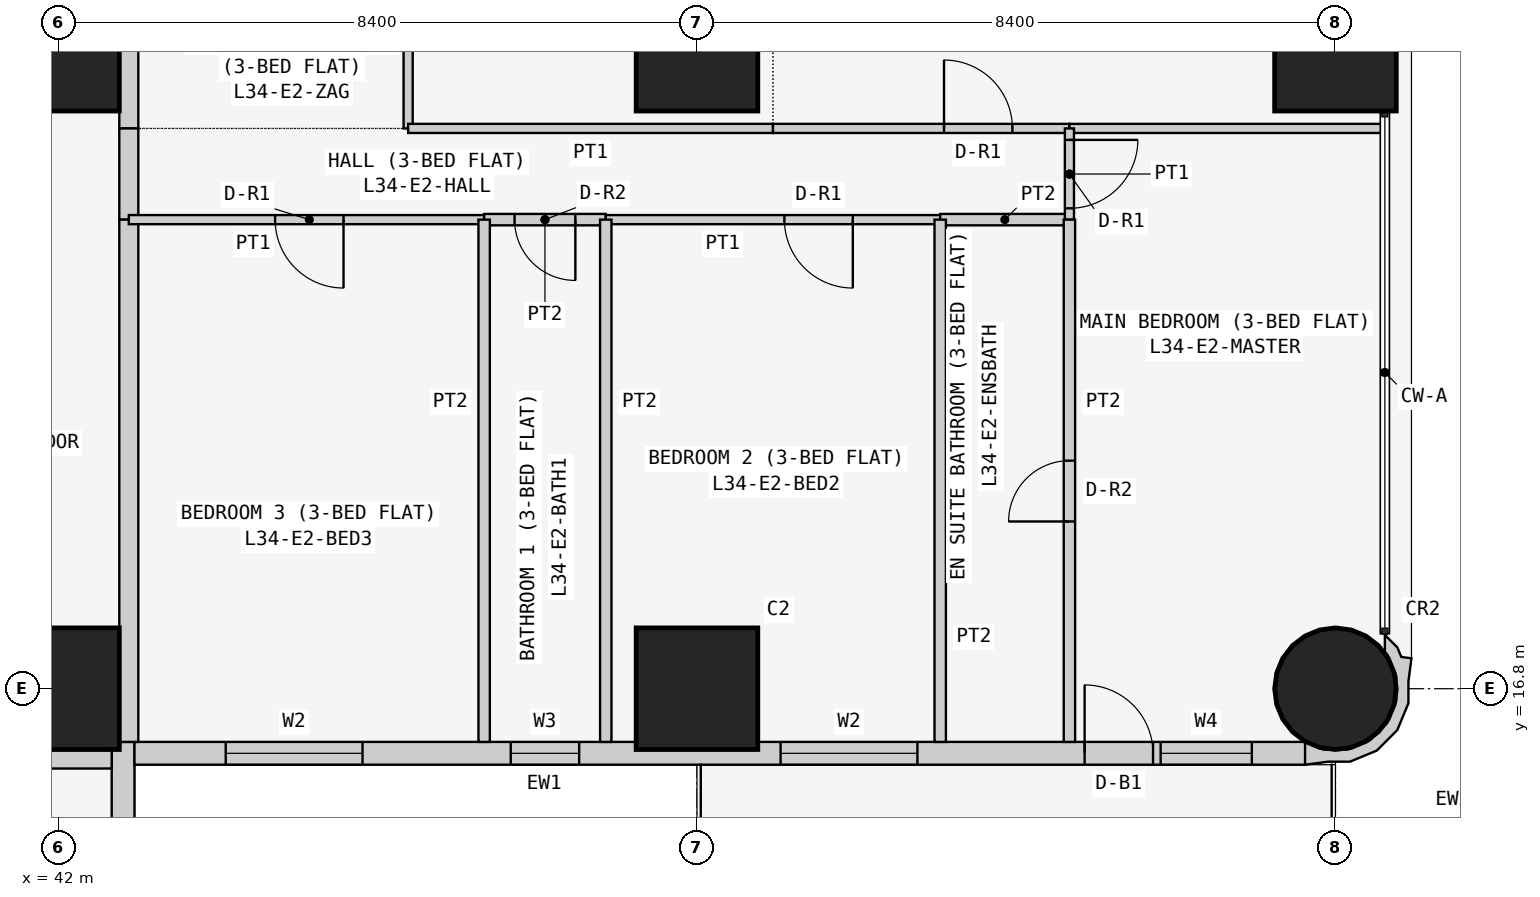
"""IFC4 building model, lengths in metres.
Left out: names, types, materials, properties, quantities, classifications, styles, units other than length and angle.
Written with IfcOpenShell. Run it as: python <this file> out.ifc"""

import sys

from ifc_helpers import new_model, si_unit, direction, frame, frame_2d, origin, origin_2d, place, context, subcontext, project, spatial, polyline, rectangle, circle, outline, extrude, element, fill, save


model = new_model("IFC4")
c1 = context("Model", 3, precision=1e-05, world=origin(), true_north=direction((0.0, 1.0)))
c2 = subcontext(c1, "Body", "Model", "MODEL_VIEW")
j1 = project(units=[si_unit("LENGTHUNIT", "METRE"), si_unit("PLANEANGLEUNIT", "RADIAN")], contexts=[c1])
p1 = place(None, origin())
s1 = spatial("IfcSite", under=j1, at=p1, CompositionType="ELEMENT")
p2 = place(p1, origin())
s2 = spatial("IfcBuilding", under=s1, at=p2, CompositionType="ELEMENT")
p3 = place(p2, frame((0.0, 0.0, 134.1)))
s3 = spatial("IfcBuildingStorey", under=s2, at=p3, CompositionType="ELEMENT", Elevation=134.1)
for number, where, z_axis, x_axis in (
    (1, (42.0, 16.8, 0.0), (0.0, 0.0, 1.0), (1.0, 0.0, 0.0)),
    (2, (42.0, 25.2, 0.0), (0.0, 0.0, 1.0), (1.0, 0.0, 0.0)),
    (3, (50.4, 16.8, 0.0), (0.0, 0.0, 1.0), (1.0, 0.0, 0.0)),
    (4, (50.4, 25.2, 0.0), (0.0, 0.0, 1.0), (1.0, 0.0, 0.0)),
):
    element("IfcColumn", number, at=place(p3, frame(where, z_axis=z_axis, x_axis=x_axis)), inside=s3, PredefinedType="COLUMN", context=c2, shape_type="SweptSolid", body=[
        extrude(rectangle(XDim=1.6, YDim=1.6, at=origin_2d()), origin(), (0.0, 0.0, 1.0), 3.6),
    ])
p4 = place(p3, frame((58.8, 16.8, 0.0), z_axis=(0.0, 0.0, 1.0), x_axis=(1.0, 0.0, 0.0)))
e5 = element("IfcColumn", 5, at=p4, inside=s3, PredefinedType="COLUMN", context=c2, shape_type="SweptSolid", body=[
    extrude(circle(Radius=0.8, at=origin_2d()), origin(), (0.0, 0.0, 1.0), 3.6),
])
p5 = place(p3, frame((58.8, 25.2, 0.0), z_axis=(0.0, 0.0, 1.0), x_axis=(1.0, 0.0, 0.0)))
e6 = element("IfcColumn", 6, at=p5, inside=s3, PredefinedType="COLUMN", context=c2, shape_type="SweptSolid", body=[
    extrude(rectangle(XDim=1.6, YDim=1.6, at=origin_2d()), origin(), (0.0, 0.0, 1.0), 3.6),
])
p6 = place(p3, frame((42.85, 8.8, 0.0), z_axis=(0.0, 0.0, 1.0), x_axis=(0.0, 1.0, 0.0)))
e7 = element("IfcWall", 7, at=p6, inside=s3, PredefinedType="SOLIDWALL", context=c2, shape_type="SweptSolid", body=[
    extrude(rectangle(XDim=7.3, YDim=0.3, at=frame_2d((3.65, 0.0))), origin(), (0.0, 0.0, 1.0), 3.45),
])
p7 = place(p6, frame((3.1, 0.0, 0.9)))
e8 = element("IfcOpeningElement", 8, at=p7, cuts=e7, PredefinedType="OPENING", context=c2, shape_type="SweptSolid", body=[
    extrude(rectangle(XDim=2.4, YDim=1.5, at=frame_2d((1.2, 0.75))), frame((0.0, 0.16, 0.0), z_axis=(0.0, -1.0, 0.0), x_axis=(1.0, 0.0, 0.0)), (0.0, 0.0, 1.0), 0.32),
])
p8 = place(p6, frame((0.75, 0.0, 0.9)))
e9 = element("IfcOpeningElement", 9, at=p8, cuts=e7, PredefinedType="OPENING", context=c2, shape_type="SweptSolid", body=[
    extrude(rectangle(XDim=1.2, YDim=1.5, at=frame_2d((0.6, 0.75))), frame((0.0, 0.16, 0.0), z_axis=(0.0, -1.0, 0.0), x_axis=(1.0, 0.0, 0.0)), (0.0, 0.0, 1.0), 0.32),
])
p9 = place(p3, frame((43.0, 15.95, 0.0), z_axis=(0.0, 0.0, 1.0), x_axis=(1.0, 0.0, 0.0)))
e10 = element("IfcWall", 10, at=p9, inside=s3, PredefinedType="SOLIDWALL", context=c2, shape_type="SweptSolid", body=[
    extrude(rectangle(XDim=15.4, YDim=0.3, at=frame_2d((7.7, 0.0))), origin(), (0.0, 0.0, 1.0), 3.45),
])
p10 = place(p9, frame((1.2, 0.0, 0.9)))
e11 = element("IfcOpeningElement", 11, at=p10, cuts=e10, PredefinedType="OPENING", context=c2, shape_type="SweptSolid", body=[
    extrude(rectangle(XDim=1.8, YDim=1.5, at=frame_2d((0.9, 0.75))), frame((0.0, 0.16, 0.0), z_axis=(0.0, -1.0, 0.0), x_axis=(1.0, 0.0, 0.0)), (0.0, 0.0, 1.0), 0.32),
])
p11 = place(p9, frame((4.95, 0.0, 1.5)))
e12 = element("IfcOpeningElement", 12, at=p11, cuts=e10, PredefinedType="OPENING", context=c2, shape_type="SweptSolid", body=[
    extrude(rectangle(XDim=0.9, YDim=0.7, at=frame_2d((0.45, 0.35))), frame((0.0, 0.16, 0.0), z_axis=(0.0, -1.0, 0.0), x_axis=(1.0, 0.0, 0.0)), (0.0, 0.0, 1.0), 0.32),
])
p12 = place(p9, frame((8.5, 0.0, 0.9)))
e13 = element("IfcOpeningElement", 13, at=p12, cuts=e10, PredefinedType="OPENING", context=c2, shape_type="SweptSolid", body=[
    extrude(rectangle(XDim=1.8, YDim=1.5, at=frame_2d((0.9, 0.75))), frame((0.0, 0.16, 0.0), z_axis=(0.0, -1.0, 0.0), x_axis=(1.0, 0.0, 0.0)), (0.0, 0.0, 1.0), 0.32),
])
p13 = place(p9, frame((12.5, 0.0, 0.0)))
e14 = element("IfcOpeningElement", 14, at=p13, cuts=e10, PredefinedType="OPENING", context=c2, shape_type="SweptSolid", body=[
    extrude(rectangle(XDim=0.9, YDim=2.4, at=frame_2d((0.45, 1.2))), frame((0.0, 0.16, 0.0), z_axis=(0.0, -1.0, 0.0), x_axis=(1.0, 0.0, 0.0)), (0.0, 0.0, 1.0), 0.32),
])
p14 = place(p9, frame((13.5, 0.0, 0.9)))
e15 = element("IfcOpeningElement", 15, at=p14, cuts=e10, PredefinedType="OPENING", context=c2, shape_type="SweptSolid", body=[
    extrude(rectangle(XDim=1.2, YDim=1.5, at=frame_2d((0.6, 0.75))), frame((0.0, 0.16, 0.0), z_axis=(0.0, -1.0, 0.0), x_axis=(1.0, 0.0, 0.0)), (0.0, 0.0, 1.0), 0.32),
])
p15 = place(p3, frame((58.473, 15.983, 0.0), z_axis=(0.0, 0.0, 1.0), x_axis=(0.93923434088, -0.343276641956, 0.0)))
e16 = element("IfcWall", 16, at=p15, inside=s3, PredefinedType="SOLIDWALL", context=c2, shape_type="SweptSolid", body=[
    extrude(outline(polyline([(0.828, 1.599), (0.697, 1.569), (0.604, 1.67), (0.394, 1.767), (0.471, 1.556), (0.508, 1.539), (0.724, 1.304), (0.834, 1.005), (0.82, 0.686), (0.686, 0.397), (0.451, 0.182), (0.152, 0.073), (-0.116, 0.084), (-0.127, 0.078), (-0.146, 0.071), (-0.006, -0.197), (0.266, -0.055), (0.535, 0.044), (0.817, 0.302), (0.978, 0.648), (0.994, 1.03), (0.895, 1.3), (0.828, 1.599)])), origin(), (0.0, 0.0, 1.0), 3.45),
])
p16 = place(p3, frame((42.925, 29.4, 0.0), z_axis=(0.0, 0.0, 1.0), x_axis=(0.0, -1.0, 0.0)))
e17 = element("IfcWall", 17, at=p16, inside=s3, PredefinedType="PARTITIONING", context=c2, shape_type="SweptSolid", body=[
    extrude(rectangle(XDim=5.229, YDim=0.25, at=frame_2d((2.615, 0.0))), origin(), (0.0, 0.0, 1.0), 3.45),
])
p17 = place(p16, frame((2.1, 0.0, 0.0)))
e18 = element("IfcOpeningElement", 18, at=p17, cuts=e17, PredefinedType="OPENING", context=c2, shape_type="SweptSolid", body=[
    extrude(rectangle(XDim=1.0, YDim=2.1, at=frame_2d((0.5, 1.05))), frame((0.0, 0.135, 0.0), z_axis=(0.0, -1.0, 0.0), x_axis=(1.0, 0.0, 0.0)), (0.0, 0.0, 1.0), 0.27),
])
p18 = place(p3, frame((42.925, 24.171, 0.0), z_axis=(0.0, 0.0, 1.0), x_axis=(0.0, -1.0, 0.0)))
e19 = element("IfcWall", 19, at=p18, inside=s3, PredefinedType="PARTITIONING", context=c2, shape_type="SweptSolid", body=[
    extrude(rectangle(XDim=1.2, YDim=0.25, at=frame_2d((0.6, 0.0))), origin(), (0.0, 0.0, 1.0), 3.45),
])
for number, where, z_axis, x_axis in (
    (20, (42.925, 22.971, 0.0), (0.0, 0.0, 1.0), (0.0, -1.0, 0.0)),
    (21, (42.7, 15.875, 0.0), (0.0, 0.0, 1.0), (-1.0, 0.0, 0.0)),
):
    element("IfcWall", number, at=place(p3, frame(where, z_axis=z_axis, x_axis=x_axis)), inside=s3, PredefinedType="PARTITIONING", context=c2, shape_type="SweptSolid", body=[
        extrude(rectangle(XDim=6.871, YDim=0.25, at=frame_2d((3.436, 0.0))), origin(), (0.0, 0.0, 1.0), 3.45),
    ])
p19 = place(p3, frame((46.6, 29.4, 0.0), z_axis=(0.0, 0.0, 1.0), x_axis=(0.0, -1.0, 0.0)))
e22 = element("IfcWall", 22, at=p19, inside=s3, PredefinedType="PARTITIONING", context=c2, shape_type="SweptSolid", body=[
    extrude(rectangle(XDim=5.229, YDim=0.12, at=frame_2d((2.615, 0.0))), origin(), (0.0, 0.0, 1.0), 3.45),
])
p20 = place(p19, frame((1.05, 0.0, 0.0)))
e23 = element("IfcOpeningElement", 23, at=p20, cuts=e22, PredefinedType="OPENING", context=c2, shape_type="SweptSolid", body=[
    extrude(rectangle(XDim=0.9, YDim=2.1, at=frame_2d((0.45, 1.05))), frame((0.0, 0.07, 0.0), z_axis=(0.0, -1.0, 0.0), x_axis=(1.0, 0.0, 0.0)), (0.0, 0.0, 1.0), 0.14),
])
p21 = place(p3, frame((51.4, 24.171, 0.0), z_axis=(0.0, 0.0, 1.0), x_axis=(-1.0, 0.0, 0.0)))
e24 = element("IfcWall", 24, at=p21, inside=s3, PredefinedType="PARTITIONING", context=c2, shape_type="SweptSolid", body=[
    extrude(rectangle(XDim=4.8, YDim=0.12, at=frame_2d((2.4, 0.0))), origin(), (0.0, 0.0, 1.0), 3.45),
])
p22 = place(p3, frame((55.3, 24.171, 0.0), z_axis=(0.0, 0.0, 1.0), x_axis=(-1.0, 0.0, 0.0)))
e25 = element("IfcWall", 25, at=p22, inside=s3, PredefinedType="PARTITIONING", context=c2, shape_type="SweptSolid", body=[
    extrude(rectangle(XDim=3.9, YDim=0.12, at=frame_2d((1.95, 0.0))), origin(), (0.0, 0.0, 1.0), 3.45),
])
p23 = place(p22, frame((0.75, 0.0, 0.0)))
e26 = element("IfcOpeningElement", 26, at=p23, cuts=e25, PredefinedType="OPENING", context=c2, shape_type="SweptSolid", body=[
    extrude(rectangle(XDim=0.9, YDim=2.1, at=frame_2d((0.45, 1.05))), frame((0.0, 0.07, 0.0), z_axis=(0.0, -1.0, 0.0), x_axis=(1.0, 0.0, 0.0)), (0.0, 0.0, 1.0), 0.14),
])
p24 = place(p3, frame((59.45, 24.171, 0.0), z_axis=(0.0, 0.0, 1.0), x_axis=(-1.0, 0.0, 0.0)))
e27 = element("IfcWall", 27, at=p24, inside=s3, PredefinedType="PARTITIONING", context=c2, shape_type="SweptSolid", body=[
    extrude(rectangle(XDim=4.15, YDim=0.12, at=frame_2d((2.075, 0.0))), origin(), (0.0, 0.0, 1.0), 3.45),
])
p25 = place(p3, frame((47.6, 22.971, 0.0), z_axis=(0.0, 0.0, 1.0), x_axis=(-1.0, 0.0, 0.0)))
e28 = element("IfcWall", 28, at=p25, inside=s3, PredefinedType="PARTITIONING", context=c2, shape_type="SweptSolid", body=[
    extrude(rectangle(XDim=4.675, YDim=0.12, at=frame_2d((2.337, 0.0))), origin(), (0.0, 0.0, 1.0), 3.45),
])
p26 = place(p25, frame((1.85, 0.0, 0.0)))
e29 = element("IfcOpeningElement", 29, at=p26, cuts=e28, PredefinedType="OPENING", context=c2, shape_type="SweptSolid", body=[
    extrude(rectangle(XDim=0.9, YDim=2.1, at=frame_2d((0.45, 1.05))), frame((0.0, 0.07, 0.0), z_axis=(0.0, -1.0, 0.0), x_axis=(1.0, 0.0, 0.0)), (0.0, 0.0, 1.0), 0.14),
])
p27 = place(p3, frame((49.2, 22.971, 0.0), z_axis=(0.0, 0.0, 1.0), x_axis=(-1.0, 0.0, 0.0)))
e30 = element("IfcWall", 30, at=p27, inside=s3, PredefinedType="PARTITIONING", context=c2, shape_type="SweptSolid", body=[
    extrude(rectangle(XDim=1.6, YDim=0.15, at=frame_2d((0.8, 0.0))), origin(), (0.0, 0.0, 1.0), 3.45),
])
p28 = place(p27, frame((0.4, 0.0, 0.0)))
e31 = element("IfcOpeningElement", 31, at=p28, cuts=e30, PredefinedType="OPENING", context=c2, shape_type="SweptSolid", body=[
    extrude(rectangle(XDim=0.8, YDim=2.1, at=frame_2d((0.4, 1.05))), frame((0.0, 0.085, 0.0), z_axis=(0.0, -1.0, 0.0), x_axis=(1.0, 0.0, 0.0)), (0.0, 0.0, 1.0), 0.17),
])
p29 = place(p3, frame((53.6, 22.971, 0.0), z_axis=(0.0, 0.0, 1.0), x_axis=(-1.0, 0.0, 0.0)))
e32 = element("IfcWall", 32, at=p29, inside=s3, PredefinedType="PARTITIONING", context=c2, shape_type="SweptSolid", body=[
    extrude(rectangle(XDim=4.4, YDim=0.12, at=frame_2d((2.2, 0.0))), origin(), (0.0, 0.0, 1.0), 3.45),
])
p30 = place(p29, frame((1.15, 0.0, 0.0)))
e33 = element("IfcOpeningElement", 33, at=p30, cuts=e32, PredefinedType="OPENING", context=c2, shape_type="SweptSolid", body=[
    extrude(rectangle(XDim=0.9, YDim=2.1, at=frame_2d((0.45, 1.05))), frame((0.0, 0.07, 0.0), z_axis=(0.0, -1.0, 0.0), x_axis=(1.0, 0.0, 0.0)), (0.0, 0.0, 1.0), 0.14),
])
p31 = place(p3, frame((55.3, 22.971, 0.0), z_axis=(0.0, 0.0, 1.0), x_axis=(-1.0, 0.0, 0.0)))
e34 = element("IfcWall", 34, at=p31, inside=s3, PredefinedType="PARTITIONING", context=c2, shape_type="SweptSolid", body=[
    extrude(rectangle(XDim=1.7, YDim=0.15, at=frame_2d((0.85, 0.0))), origin(), (0.0, 0.0, 1.0), 3.45),
])
p32 = place(p3, frame((55.3, 24.171, 0.0), z_axis=(0.0, 0.0, 1.0), x_axis=(0.0, -1.0, 0.0)))
e35 = element("IfcWall", 35, at=p32, inside=s3, PredefinedType="PARTITIONING", context=c2, shape_type="SweptSolid", body=[
    extrude(rectangle(XDim=1.2, YDim=0.12, at=frame_2d((0.6, 0.0))), origin(), (0.0, 0.0, 1.0), 3.45),
])
p33 = place(p32, frame((0.151, 0.0, 0.0)))
e36 = element("IfcOpeningElement", 36, at=p33, cuts=e35, PredefinedType="OPENING", context=c2, shape_type="SweptSolid", body=[
    extrude(rectangle(XDim=0.9, YDim=2.1, at=frame_2d((0.45, 1.05))), frame((0.0, 0.07, 0.0), z_axis=(0.0, -1.0, 0.0), x_axis=(1.0, 0.0, 0.0)), (0.0, 0.0, 1.0), 0.14),
])
for number, where, z_axis, x_axis in (
    (37, (47.6, 22.971, 0.0), (0.0, 0.0, 1.0), (0.0, -1.0, 0.0)),
    (38, (49.2, 22.971, 0.0), (0.0, 0.0, 1.0), (0.0, -1.0, 0.0)),
    (39, (53.6, 22.971, 0.0), (0.0, 0.0, 1.0), (0.0, -1.0, 0.0)),
):
    element("IfcWall", number, at=place(p3, frame(where, z_axis=z_axis, x_axis=x_axis)), inside=s3, PredefinedType="PARTITIONING", context=c2, shape_type="SweptSolid", body=[
        extrude(rectangle(XDim=6.871, YDim=0.15, at=frame_2d((3.436, 0.0))), origin(), (0.0, 0.0, 1.0), 3.45),
    ])
p34 = place(p3, frame((55.3, 22.971, 0.0), z_axis=(0.0, 0.0, 1.0), x_axis=(0.0, -1.0, 0.0)))
e40 = element("IfcWall", 40, at=p34, inside=s3, PredefinedType="PARTITIONING", context=c2, shape_type="SweptSolid", body=[
    extrude(rectangle(XDim=6.871, YDim=0.15, at=frame_2d((3.436, 0.0))), origin(), (0.0, 0.0, 1.0), 3.45),
])
p35 = place(p34, frame((3.171, 0.0, 0.0)))
e41 = element("IfcOpeningElement", 41, at=p35, cuts=e40, PredefinedType="OPENING", context=c2, shape_type="SweptSolid", body=[
    extrude(rectangle(XDim=0.8, YDim=2.1, at=frame_2d((0.4, 1.05))), frame((0.0, 0.085, 0.0), z_axis=(0.0, -1.0, 0.0), x_axis=(1.0, 0.0, 0.0)), (0.0, 0.0, 1.0), 0.17),
])
p36 = place(p10, origin())
e42 = element("IfcWindow", 42, at=p36, inside=s3, PartitioningType="SINGLE_PANEL", PredefinedType="WINDOW", context=c2, shape_type="SweptSolid", body=[
    extrude(rectangle(XDim=1.8, YDim=1.5, at=frame_2d((0.9, 0.75))), frame((0.0, 0.03, 0.0), z_axis=(0.0, -1.0, 0.0), x_axis=(1.0, 0.0, 0.0)), (0.0, 0.0, 1.0), 0.06),
])
fill(e11, e42)
p37 = place(p11, origin())
e43 = element("IfcWindow", 43, at=p37, inside=s3, PartitioningType="SINGLE_PANEL", PredefinedType="WINDOW", context=c2, shape_type="SweptSolid", body=[
    extrude(rectangle(XDim=0.9, YDim=0.7, at=frame_2d((0.45, 0.35))), frame((0.0, 0.03, 0.0), z_axis=(0.0, -1.0, 0.0), x_axis=(1.0, 0.0, 0.0)), (0.0, 0.0, 1.0), 0.06),
])
fill(e12, e43)
p38 = place(p12, origin())
e44 = element("IfcWindow", 44, at=p38, inside=s3, PartitioningType="SINGLE_PANEL", PredefinedType="WINDOW", context=c2, shape_type="SweptSolid", body=[
    extrude(rectangle(XDim=1.8, YDim=1.5, at=frame_2d((0.9, 0.75))), frame((0.0, 0.03, 0.0), z_axis=(0.0, -1.0, 0.0), x_axis=(1.0, 0.0, 0.0)), (0.0, 0.0, 1.0), 0.06),
])
fill(e13, e44)
p39 = place(p13, origin())
e45 = element("IfcDoor", 45, at=p39, inside=s3, OperationType="SINGLE_SWING_LEFT", PredefinedType="DOOR", context=c2, shape_type="SweptSolid", body=[
    extrude(rectangle(XDim=0.9, YDim=2.4, at=frame_2d((0.45, 1.2))), frame((0.0, 0.025, 0.0), z_axis=(0.0, -1.0, 0.0), x_axis=(1.0, 0.0, 0.0)), (0.0, 0.0, 1.0), 0.05),
])
fill(e14, e45)
p40 = place(p14, origin())
e46 = element("IfcWindow", 46, at=p40, inside=s3, PartitioningType="SINGLE_PANEL", PredefinedType="WINDOW", context=c2, shape_type="SweptSolid", body=[
    extrude(rectangle(XDim=1.2, YDim=1.5, at=frame_2d((0.6, 0.75))), frame((0.0, 0.03, 0.0), z_axis=(0.0, -1.0, 0.0), x_axis=(1.0, 0.0, 0.0)), (0.0, 0.0, 1.0), 0.06),
])
fill(e15, e46)
p41 = place(p23, frame((0.9, 0.0, 0.0), z_axis=(0.0, 0.0, 1.0), x_axis=(-1.0, 0.0, 0.0)))
e47 = element("IfcDoor", 47, at=p41, inside=s3, OperationType="SINGLE_SWING_LEFT", PredefinedType="DOOR", context=c2, shape_type="SweptSolid", body=[
    extrude(rectangle(XDim=0.9, YDim=2.1, at=frame_2d((0.45, 1.05))), frame((0.0, 0.025, 0.0), z_axis=(0.0, -1.0, 0.0), x_axis=(1.0, 0.0, 0.0)), (0.0, 0.0, 1.0), 0.05),
])
fill(e26, e47)
p42 = place(p26, origin())
e48 = element("IfcDoor", 48, at=p42, inside=s3, OperationType="SINGLE_SWING_LEFT", PredefinedType="DOOR", context=c2, shape_type="SweptSolid", body=[
    extrude(rectangle(XDim=0.9, YDim=2.1, at=frame_2d((0.45, 1.05))), frame((0.0, 0.025, 0.0), z_axis=(0.0, -1.0, 0.0), x_axis=(1.0, 0.0, 0.0)), (0.0, 0.0, 1.0), 0.05),
])
fill(e29, e48)
p43 = place(p28, origin())
e49 = element("IfcDoor", 49, at=p43, inside=s3, OperationType="SINGLE_SWING_LEFT", PredefinedType="DOOR", context=c2, shape_type="SweptSolid", body=[
    extrude(rectangle(XDim=0.8, YDim=2.1, at=frame_2d((0.4, 1.05))), frame((0.0, 0.025, 0.0), z_axis=(0.0, -1.0, 0.0), x_axis=(1.0, 0.0, 0.0)), (0.0, 0.0, 1.0), 0.05),
])
fill(e31, e49)
p44 = place(p30, origin())
e50 = element("IfcDoor", 50, at=p44, inside=s3, OperationType="SINGLE_SWING_LEFT", PredefinedType="DOOR", context=c2, shape_type="SweptSolid", body=[
    extrude(rectangle(XDim=0.9, YDim=2.1, at=frame_2d((0.45, 1.05))), frame((0.0, 0.025, 0.0), z_axis=(0.0, -1.0, 0.0), x_axis=(1.0, 0.0, 0.0)), (0.0, 0.0, 1.0), 0.05),
])
fill(e33, e50)
p45 = place(p33, origin())
e51 = element("IfcDoor", 51, at=p45, inside=s3, OperationType="SINGLE_SWING_LEFT", PredefinedType="DOOR", context=c2, shape_type="SweptSolid", body=[
    extrude(rectangle(XDim=0.9, YDim=2.1, at=frame_2d((0.45, 1.05))), frame((0.0, 0.025, 0.0), z_axis=(0.0, -1.0, 0.0), x_axis=(1.0, 0.0, 0.0)), (0.0, 0.0, 1.0), 0.05),
])
fill(e36, e51)
p46 = place(p35, frame((0.8, 0.0, 0.0), z_axis=(0.0, 0.0, 1.0), x_axis=(-1.0, 0.0, 0.0)))
e52 = element("IfcDoor", 52, at=p46, inside=s3, OperationType="SINGLE_SWING_LEFT", PredefinedType="DOOR", context=c2, shape_type="SweptSolid", body=[
    extrude(rectangle(XDim=0.8, YDim=2.1, at=frame_2d((0.4, 1.05))), frame((0.0, 0.025, 0.0), z_axis=(0.0, -1.0, 0.0), x_axis=(1.0, 0.0, 0.0)), (0.0, 0.0, 1.0), 0.05),
])
fill(e41, e52)
save(model, sys.argv[1])
